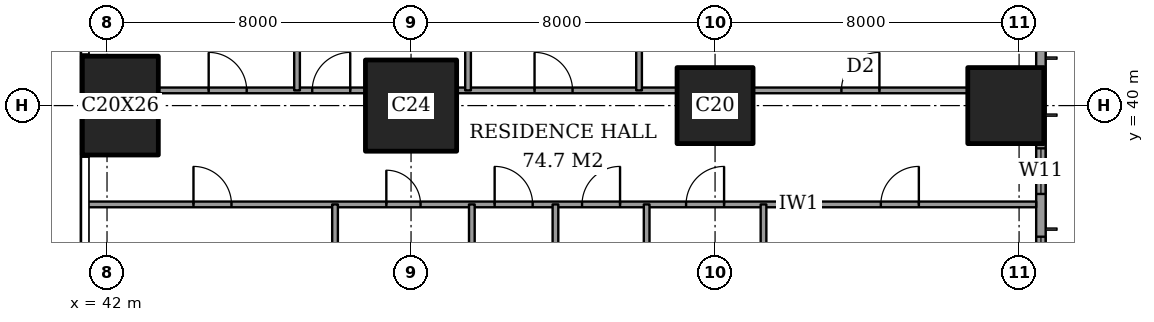
"""IFC4 building model, lengths in metres.
Left out: names, types, materials, properties, quantities, classifications, styles, units other than length and angle.
Written with IfcOpenShell. Run it as: python <this file> out.ifc"""

import sys

from ifc_helpers import new_model, si_unit, direction, frame, frame_2d, origin, origin_2d, place, context, subcontext, project, spatial, rectangle, extrude, element, fill, save


model = new_model("IFC4")
c1 = context("Model", 3, precision=1e-05, world=origin(), true_north=direction((0.0, 1.0)))
c2 = subcontext(c1, "Body", "Model", "MODEL_VIEW")
j1 = project(units=[si_unit("LENGTHUNIT", "METRE"), si_unit("PLANEANGLEUNIT", "RADIAN")], contexts=[c1])
p1 = place(None, origin())
s1 = spatial("IfcSite", under=j1, at=p1, CompositionType="ELEMENT")
p2 = place(p1, origin())
s2 = spatial("IfcBuilding", under=s1, at=p2, CompositionType="ELEMENT")
p3 = place(p2, frame((0.0, 0.0, 128.6)))
s3 = spatial("IfcBuildingStorey", under=s2, at=p3, CompositionType="ELEMENT", Elevation=128.6)
p4 = place(p3, frame((42.35, 40.0, 0.0), z_axis=(0.0, 0.0, 1.0), x_axis=(1.0, 0.0, 0.0)))
e1 = element("IfcColumn", 1, at=p4, inside=s3, PredefinedType="COLUMN", context=c2, shape_type="SweptSolid", body=[
    extrude(rectangle(XDim=2.0, YDim=2.6, at=origin_2d()), origin(), (0.0, 0.0, 1.0), 3.6),
])
p5 = place(p3, frame((50.0, 40.0, 0.0), z_axis=(0.0, 0.0, 1.0), x_axis=(1.0, 0.0, 0.0)))
e2 = element("IfcColumn", 2, at=p5, inside=s3, PredefinedType="COLUMN", context=c2, shape_type="SweptSolid", body=[
    extrude(rectangle(XDim=2.4, YDim=2.4, at=origin_2d()), origin(), (0.0, 0.0, 1.0), 3.6),
])
for number, where, z_axis, x_axis in (
    (3, (58.0, 40.0, 0.0), (0.0, 0.0, 1.0), (1.0, 0.0, 0.0)),
    (4, (65.65, 40.0, 0.0), (0.0, 0.0, 1.0), (1.0, 0.0, 0.0)),
):
    element("IfcColumn", number, at=place(p3, frame(where, z_axis=z_axis, x_axis=x_axis)), inside=s3, PredefinedType="COLUMN", context=c2, shape_type="SweptSolid", body=[
        extrude(rectangle(XDim=2.0, YDim=2.0, at=origin_2d()), origin(), (0.0, 0.0, 1.0), 3.6),
    ])
p6 = place(p3, frame((66.575, 3.175, 0.0), z_axis=(0.0, 0.0, 1.0), x_axis=(0.0, 1.0, 0.0)))
e5 = element("IfcWall", 5, at=p6, inside=s3, PredefinedType="SOLIDWALL", context=c2, shape_type="SweptSolid", body=[
    extrude(rectangle(XDim=41.65, YDim=0.25, at=frame_2d((20.825, 0.0))), origin(), (0.0, 0.0, 1.0), 3.6),
])
p7 = place(p6, frame((0.775, 0.0, 0.4)))
e6 = element("IfcOpeningElement", 6, at=p7, cuts=e5, PredefinedType="OPENING", context=c2, shape_type="SweptSolid", body=[
    extrude(rectangle(XDim=2.4, YDim=2.2, at=frame_2d((1.2, 1.1))), frame((0.0, 0.135, 0.0), z_axis=(0.0, -1.0, 0.0), x_axis=(1.0, 0.0, 0.0)), (0.0, 0.0, 1.0), 0.27),
])
p8 = place(p6, frame((6.125, 0.0, 0.4)))
e7 = element("IfcOpeningElement", 7, at=p8, cuts=e5, PredefinedType="OPENING", context=c2, shape_type="SweptSolid", body=[
    extrude(rectangle(XDim=1.2, YDim=2.2, at=frame_2d((0.6, 1.1))), frame((0.0, 0.135, 0.0), z_axis=(0.0, -1.0, 0.0), x_axis=(1.0, 0.0, 0.0)), (0.0, 0.0, 1.0), 0.27),
])
p9 = place(p6, frame((8.375, 0.0, 0.4)))
e8 = element("IfcOpeningElement", 8, at=p9, cuts=e5, PredefinedType="OPENING", context=c2, shape_type="SweptSolid", body=[
    extrude(rectangle(XDim=2.4, YDim=2.2, at=frame_2d((1.2, 1.1))), frame((0.0, 0.135, 0.0), z_axis=(0.0, -1.0, 0.0), x_axis=(1.0, 0.0, 0.0)), (0.0, 0.0, 1.0), 0.27),
])
p10 = place(p6, frame((15.775, 0.0, 0.4)))
e9 = element("IfcOpeningElement", 9, at=p10, cuts=e5, PredefinedType="OPENING", context=c2, shape_type="SweptSolid", body=[
    extrude(rectangle(XDim=2.4, YDim=2.2, at=frame_2d((1.2, 1.1))), frame((0.0, 0.135, 0.0), z_axis=(0.0, -1.0, 0.0), x_axis=(1.0, 0.0, 0.0)), (0.0, 0.0, 1.0), 0.27),
])
p11 = place(p6, frame((23.475, 0.0, 0.4)))
e10 = element("IfcOpeningElement", 10, at=p11, cuts=e5, PredefinedType="OPENING", context=c2, shape_type="SweptSolid", body=[
    extrude(rectangle(XDim=2.4, YDim=2.2, at=frame_2d((1.2, 1.1))), frame((0.0, 0.135, 0.0), z_axis=(0.0, -1.0, 0.0), x_axis=(1.0, 0.0, 0.0)), (0.0, 0.0, 1.0), 0.27),
])
p12 = place(p6, frame((30.975, 0.0, 0.4)))
e11 = element("IfcOpeningElement", 11, at=p12, cuts=e5, PredefinedType="OPENING", context=c2, shape_type="SweptSolid", body=[
    extrude(rectangle(XDim=2.4, YDim=2.2, at=frame_2d((1.2, 1.1))), frame((0.0, 0.135, 0.0), z_axis=(0.0, -1.0, 0.0), x_axis=(1.0, 0.0, 0.0)), (0.0, 0.0, 1.0), 0.27),
])
p13 = place(p6, frame((34.5, 0.0, 0.4)))
e12 = element("IfcOpeningElement", 12, at=p13, cuts=e5, PredefinedType="OPENING", context=c2, shape_type="SweptSolid", body=[
    extrude(rectangle(XDim=1.2, YDim=2.2, at=frame_2d((0.6, 1.1))), frame((0.0, 0.135, 0.0), z_axis=(0.0, -1.0, 0.0), x_axis=(1.0, 0.0, 0.0)), (0.0, 0.0, 1.0), 0.27),
])
p14 = place(p6, frame((38.475, 0.0, 0.4)))
e13 = element("IfcOpeningElement", 13, at=p14, cuts=e5, PredefinedType="OPENING", context=c2, shape_type="SweptSolid", body=[
    extrude(rectangle(XDim=2.4, YDim=2.2, at=frame_2d((1.2, 1.1))), frame((0.0, 0.135, 0.0), z_axis=(0.0, -1.0, 0.0), x_axis=(1.0, 0.0, 0.0)), (0.0, 0.0, 1.0), 0.27),
])
p15 = place(p3, frame((41.439, 37.4, 0.0), z_axis=(0.0, 0.0, 1.0), x_axis=(1.0, 0.0, 0.0)))
e14 = element("IfcWall", 14, at=p15, inside=s3, PredefinedType="PARTITIONING", context=c2, shape_type="SweptSolid", body=[
    extrude(rectangle(XDim=25.011, YDim=0.15, at=frame_2d((12.505, 0.0))), origin(), (0.0, 0.0, 1.0), 3.35),
])
p16 = place(p15, frame((10.761, 0.0, 0.0)))
e15 = element("IfcOpeningElement", 15, at=p16, cuts=e14, PredefinedType="OPENING", context=c2, shape_type="SweptSolid", body=[
    extrude(rectangle(XDim=1.0, YDim=2.1, at=frame_2d((0.5, 1.05))), frame((0.0, 0.085, 0.0), z_axis=(0.0, -1.0, 0.0), x_axis=(1.0, 0.0, 0.0)), (0.0, 0.0, 1.0), 0.17),
])
p17 = place(p15, frame((20.924, 0.0, 0.0)))
e16 = element("IfcOpeningElement", 16, at=p17, cuts=e14, PredefinedType="OPENING", context=c2, shape_type="SweptSolid", body=[
    extrude(rectangle(XDim=1.0, YDim=2.1, at=frame_2d((0.5, 1.05))), frame((0.0, 0.085, 0.0), z_axis=(0.0, -1.0, 0.0), x_axis=(1.0, 0.0, 0.0)), (0.0, 0.0, 1.0), 0.17),
])
p18 = place(p15, frame((15.799, 0.0, 0.0)))
e17 = element("IfcOpeningElement", 17, at=p18, cuts=e14, PredefinedType="OPENING", context=c2, shape_type="SweptSolid", body=[
    extrude(rectangle(XDim=1.0, YDim=2.1, at=frame_2d((0.5, 1.05))), frame((0.0, 0.085, 0.0), z_axis=(0.0, -1.0, 0.0), x_axis=(1.0, 0.0, 0.0)), (0.0, 0.0, 1.0), 0.17),
])
p19 = place(p15, frame((13.061, 0.0, 0.0)))
e18 = element("IfcOpeningElement", 18, at=p19, cuts=e14, PredefinedType="OPENING", context=c2, shape_type="SweptSolid", body=[
    extrude(rectangle(XDim=1.0, YDim=2.1, at=frame_2d((0.5, 1.05))), frame((0.0, 0.085, 0.0), z_axis=(0.0, -1.0, 0.0), x_axis=(1.0, 0.0, 0.0)), (0.0, 0.0, 1.0), 0.17),
])
p20 = place(p15, frame((7.911, 0.0, 0.0)))
e19 = element("IfcOpeningElement", 19, at=p20, cuts=e14, PredefinedType="OPENING", context=c2, shape_type="SweptSolid", body=[
    extrude(rectangle(XDim=0.9, YDim=2.1, at=frame_2d((0.45, 1.05))), frame((0.0, 0.085, 0.0), z_axis=(0.0, -1.0, 0.0), x_axis=(1.0, 0.0, 0.0)), (0.0, 0.0, 1.0), 0.17),
])
p21 = place(p15, frame((2.836, 0.0, 0.0)))
e20 = element("IfcOpeningElement", 20, at=p21, cuts=e14, PredefinedType="OPENING", context=c2, shape_type="SweptSolid", body=[
    extrude(rectangle(XDim=1.0, YDim=2.1, at=frame_2d((0.5, 1.05))), frame((0.0, 0.085, 0.0), z_axis=(0.0, -1.0, 0.0), x_axis=(1.0, 0.0, 0.0)), (0.0, 0.0, 1.0), 0.17),
])
p22 = place(p3, frame((43.35, 40.4, 0.0), z_axis=(0.0, 0.0, 1.0), x_axis=(1.0, 0.0, 0.0)))
e21 = element("IfcWall", 21, at=p22, inside=s3, PredefinedType="PARTITIONING", context=c2, shape_type="SweptSolid", body=[
    extrude(rectangle(XDim=5.45, YDim=0.15, at=frame_2d((2.725, 0.0))), origin(), (0.0, 0.0, 1.0), 3.35),
])
p23 = place(p22, frame((4.05, 0.0, 0.0)))
e22 = element("IfcOpeningElement", 22, at=p23, cuts=e21, PredefinedType="OPENING", context=c2, shape_type="SweptSolid", body=[
    extrude(rectangle(XDim=1.0, YDim=2.1, at=frame_2d((0.5, 1.05))), frame((0.0, 0.085, 0.0), z_axis=(0.0, -1.0, 0.0), x_axis=(1.0, 0.0, 0.0)), (0.0, 0.0, 1.0), 0.17),
])
p24 = place(p22, frame((1.325, 0.0, 0.0)))
e23 = element("IfcOpeningElement", 23, at=p24, cuts=e21, PredefinedType="OPENING", context=c2, shape_type="SweptSolid", body=[
    extrude(rectangle(XDim=1.0, YDim=2.1, at=frame_2d((0.5, 1.05))), frame((0.0, 0.085, 0.0), z_axis=(0.0, -1.0, 0.0), x_axis=(1.0, 0.0, 0.0)), (0.0, 0.0, 1.0), 0.17),
])
p25 = place(p3, frame((51.2, 40.4, 0.0), z_axis=(0.0, 0.0, 1.0), x_axis=(1.0, 0.0, 0.0)))
e24 = element("IfcWall", 24, at=p25, inside=s3, PredefinedType="PARTITIONING", context=c2, shape_type="SweptSolid", body=[
    extrude(rectangle(XDim=5.8, YDim=0.15, at=frame_2d((2.9, 0.0))), origin(), (0.0, 0.0, 1.0), 3.35),
])
p26 = place(p25, frame((2.05, 0.0, 0.0)))
e25 = element("IfcOpeningElement", 25, at=p26, cuts=e24, PredefinedType="OPENING", context=c2, shape_type="SweptSolid", body=[
    extrude(rectangle(XDim=1.0, YDim=2.1, at=frame_2d((0.5, 1.05))), frame((0.0, 0.085, 0.0), z_axis=(0.0, -1.0, 0.0), x_axis=(1.0, 0.0, 0.0)), (0.0, 0.0, 1.0), 0.17),
])
p27 = place(p3, frame((59.0, 40.4, 0.0), z_axis=(0.0, 0.0, 1.0), x_axis=(1.0, 0.0, 0.0)))
e26 = element("IfcWall", 26, at=p27, inside=s3, PredefinedType="PARTITIONING", context=c2, shape_type="SweptSolid", body=[
    extrude(rectangle(XDim=5.65, YDim=0.15, at=frame_2d((2.825, 0.0))), origin(), (0.0, 0.0, 1.0), 3.35),
])
p28 = place(p27, frame((2.325, 0.0, 0.0)))
e27 = element("IfcOpeningElement", 27, at=p28, cuts=e26, PredefinedType="OPENING", context=c2, shape_type="SweptSolid", body=[
    extrude(rectangle(XDim=1.0, YDim=2.1, at=frame_2d((0.5, 1.05))), frame((0.0, 0.085, 0.0), z_axis=(0.0, -1.0, 0.0), x_axis=(1.0, 0.0, 0.0)), (0.0, 0.0, 1.0), 0.17),
])
p29 = place(p3, frame((47.0, 40.4, 0.0), z_axis=(0.0, 0.0, 1.0), x_axis=(0.0, 1.0, 0.0)))
e28 = element("IfcWall", 28, at=p29, inside=s3, PredefinedType="PARTITIONING", context=c2, shape_type="SweptSolid", body=[
    extrude(rectangle(XDim=8.05, YDim=0.15, at=frame_2d((4.025, 0.0))), origin(), (0.0, 0.0, 1.0), 3.35),
])
p30 = place(p3, frame((48.0, 28.0, 0.0), z_axis=(0.0, 0.0, 1.0), x_axis=(0.0, 1.0, 0.0)))
e29 = element("IfcWall", 29, at=p30, inside=s3, PredefinedType="PARTITIONING", context=c2, shape_type="SweptSolid", body=[
    extrude(rectangle(XDim=9.4, YDim=0.15, at=frame_2d((4.7, 0.0))), origin(), (0.0, 0.0, 1.0), 3.35),
])
p31 = place(p30, frame((0.325, 0.0, 0.0)))
e30 = element("IfcOpeningElement", 30, at=p31, cuts=e29, PredefinedType="OPENING", context=c2, shape_type="SweptSolid", body=[
    extrude(rectangle(XDim=0.9, YDim=2.1, at=frame_2d((0.45, 1.05))), frame((0.0, 0.085, 0.0), z_axis=(0.0, -1.0, 0.0), x_axis=(1.0, 0.0, 0.0)), (0.0, 0.0, 1.0), 0.17),
])
p32 = place(p3, frame((51.5, 40.4, 0.0), z_axis=(0.0, 0.0, 1.0), x_axis=(0.0, 1.0, 0.0)))
e31 = element("IfcWall", 31, at=p32, inside=s3, PredefinedType="PARTITIONING", context=c2, shape_type="SweptSolid", body=[
    extrude(rectangle(XDim=8.05, YDim=0.15, at=frame_2d((4.025, 0.0))), origin(), (0.0, 0.0, 1.0), 3.35),
])
for number, where, z_axis, x_axis in (
    (32, (51.6, 29.55, 0.0), (0.0, 0.0, 1.0), (0.0, 1.0, 0.0)),
    (33, (53.8, 29.55, 0.0), (0.0, 0.0, 1.0), (0.0, 1.0, 0.0)),
):
    element("IfcWall", number, at=place(p3, frame(where, z_axis=z_axis, x_axis=x_axis)), inside=s3, PredefinedType="PARTITIONING", context=c2, shape_type="SweptSolid", body=[
        extrude(rectangle(XDim=7.85, YDim=0.15, at=frame_2d((3.925, 0.0))), origin(), (0.0, 0.0, 1.0), 3.35),
    ])
p33 = place(p3, frame((56.0, 40.4, 0.0), z_axis=(0.0, 0.0, 1.0), x_axis=(0.0, 1.0, 0.0)))
e34 = element("IfcWall", 34, at=p33, inside=s3, PredefinedType="PARTITIONING", context=c2, shape_type="SweptSolid", body=[
    extrude(rectangle(XDim=8.05, YDim=0.15, at=frame_2d((4.025, 0.0))), origin(), (0.0, 0.0, 1.0), 3.35),
])
p34 = place(p3, frame((56.2, 28.0, 0.0), z_axis=(0.0, 0.0, 1.0), x_axis=(0.0, 1.0, 0.0)))
e35 = element("IfcWall", 35, at=p34, inside=s3, PredefinedType="PARTITIONING", context=c2, shape_type="SweptSolid", body=[
    extrude(rectangle(XDim=9.4, YDim=0.15, at=frame_2d((4.7, 0.0))), origin(), (0.0, 0.0, 1.0), 3.35),
])
p35 = place(p34, frame((0.325, 0.0, 0.0)))
e36 = element("IfcOpeningElement", 36, at=p35, cuts=e35, PredefinedType="OPENING", context=c2, shape_type="SweptSolid", body=[
    extrude(rectangle(XDim=0.9, YDim=2.1, at=frame_2d((0.45, 1.05))), frame((0.0, 0.085, 0.0), z_axis=(0.0, -1.0, 0.0), x_axis=(1.0, 0.0, 0.0)), (0.0, 0.0, 1.0), 0.17),
])
p36 = place(p3, frame((59.275, 33.2, 0.0), z_axis=(0.0, 0.0, 1.0), x_axis=(0.0, 1.0, 0.0)))
e37 = element("IfcWall", 37, at=p36, inside=s3, PredefinedType="PARTITIONING", context=c2, shape_type="SweptSolid", body=[
    extrude(rectangle(XDim=4.2, YDim=0.15, at=frame_2d((2.1, 0.0))), origin(), (0.0, 0.0, 1.0), 3.35),
])
p37 = place(p12, origin())
e38 = element("IfcWindow", 38, at=p37, inside=s3, PartitioningType="SINGLE_PANEL", PredefinedType="WINDOW", context=c2, shape_type="SweptSolid", body=[
    extrude(rectangle(XDim=2.4, YDim=2.2, at=frame_2d((1.2, 1.1))), frame((0.0, 0.03, 0.0), z_axis=(0.0, -1.0, 0.0), x_axis=(1.0, 0.0, 0.0)), (0.0, 0.0, 1.0), 0.06),
])
fill(e11, e38)
p38 = place(p13, origin())
e39 = element("IfcWindow", 39, at=p38, inside=s3, PartitioningType="SINGLE_PANEL", PredefinedType="WINDOW", context=c2, shape_type="SweptSolid", body=[
    extrude(rectangle(XDim=1.2, YDim=2.2, at=frame_2d((0.6, 1.1))), frame((0.0, 0.03, 0.0), z_axis=(0.0, -1.0, 0.0), x_axis=(1.0, 0.0, 0.0)), (0.0, 0.0, 1.0), 0.06),
])
fill(e12, e39)
p39 = place(p28, origin())
e40 = element("IfcDoor", 40, at=p39, inside=s3, OperationType="SINGLE_SWING_LEFT", PredefinedType="DOOR", context=c2, shape_type="SweptSolid", body=[
    extrude(rectangle(XDim=1.0, YDim=2.1, at=frame_2d((0.5, 1.05))), frame((0.0, 0.025, 0.0), z_axis=(0.0, -1.0, 0.0), x_axis=(1.0, 0.0, 0.0)), (0.0, 0.0, 1.0), 0.05),
])
fill(e27, e40)
p40 = place(p26, origin())
e41 = element("IfcDoor", 41, at=p40, inside=s3, OperationType="SINGLE_SWING_RIGHT", PredefinedType="DOOR", context=c2, shape_type="SweptSolid", body=[
    extrude(rectangle(XDim=1.0, YDim=2.1, at=frame_2d((0.5, 1.05))), frame((0.0, 0.025, 0.0), z_axis=(0.0, -1.0, 0.0), x_axis=(1.0, 0.0, 0.0)), (0.0, 0.0, 1.0), 0.05),
])
fill(e25, e41)
p41 = place(p23, origin())
e42 = element("IfcDoor", 42, at=p41, inside=s3, OperationType="SINGLE_SWING_LEFT", PredefinedType="DOOR", context=c2, shape_type="SweptSolid", body=[
    extrude(rectangle(XDim=1.0, YDim=2.1, at=frame_2d((0.5, 1.05))), frame((0.0, 0.025, 0.0), z_axis=(0.0, -1.0, 0.0), x_axis=(1.0, 0.0, 0.0)), (0.0, 0.0, 1.0), 0.05),
])
fill(e22, e42)
p42 = place(p24, origin())
e43 = element("IfcDoor", 43, at=p42, inside=s3, OperationType="SINGLE_SWING_RIGHT", PredefinedType="DOOR", context=c2, shape_type="SweptSolid", body=[
    extrude(rectangle(XDim=1.0, YDim=2.1, at=frame_2d((0.5, 1.05))), frame((0.0, 0.025, 0.0), z_axis=(0.0, -1.0, 0.0), x_axis=(1.0, 0.0, 0.0)), (0.0, 0.0, 1.0), 0.05),
])
fill(e23, e43)
p43 = place(p16, origin())
e44 = element("IfcDoor", 44, at=p43, inside=s3, OperationType="SINGLE_SWING_RIGHT", PredefinedType="DOOR", context=c2, shape_type="SweptSolid", body=[
    extrude(rectangle(XDim=1.0, YDim=2.1, at=frame_2d((0.5, 1.05))), frame((0.0, 0.025, 0.0), z_axis=(0.0, -1.0, 0.0), x_axis=(1.0, 0.0, 0.0)), (0.0, 0.0, 1.0), 0.05),
])
fill(e15, e44)
p44 = place(p17, origin())
e45 = element("IfcDoor", 45, at=p44, inside=s3, OperationType="SINGLE_SWING_LEFT", PredefinedType="DOOR", context=c2, shape_type="SweptSolid", body=[
    extrude(rectangle(XDim=1.0, YDim=2.1, at=frame_2d((0.5, 1.05))), frame((0.0, 0.025, 0.0), z_axis=(0.0, -1.0, 0.0), x_axis=(1.0, 0.0, 0.0)), (0.0, 0.0, 1.0), 0.05),
])
fill(e16, e45)
p45 = place(p18, origin())
e46 = element("IfcDoor", 46, at=p45, inside=s3, OperationType="SINGLE_SWING_LEFT", PredefinedType="DOOR", context=c2, shape_type="SweptSolid", body=[
    extrude(rectangle(XDim=1.0, YDim=2.1, at=frame_2d((0.5, 1.05))), frame((0.0, 0.025, 0.0), z_axis=(0.0, -1.0, 0.0), x_axis=(1.0, 0.0, 0.0)), (0.0, 0.0, 1.0), 0.05),
])
fill(e17, e46)
p46 = place(p19, origin())
e47 = element("IfcDoor", 47, at=p46, inside=s3, OperationType="SINGLE_SWING_LEFT", PredefinedType="DOOR", context=c2, shape_type="SweptSolid", body=[
    extrude(rectangle(XDim=1.0, YDim=2.1, at=frame_2d((0.5, 1.05))), frame((0.0, 0.025, 0.0), z_axis=(0.0, -1.0, 0.0), x_axis=(1.0, 0.0, 0.0)), (0.0, 0.0, 1.0), 0.05),
])
fill(e18, e47)
p47 = place(p20, origin())
e48 = element("IfcDoor", 48, at=p47, inside=s3, OperationType="SINGLE_SWING_RIGHT", PredefinedType="DOOR", context=c2, shape_type="SweptSolid", body=[
    extrude(rectangle(XDim=0.9, YDim=2.1, at=frame_2d((0.45, 1.05))), frame((0.0, 0.025, 0.0), z_axis=(0.0, -1.0, 0.0), x_axis=(1.0, 0.0, 0.0)), (0.0, 0.0, 1.0), 0.05),
])
fill(e19, e48)
p48 = place(p21, origin())
e49 = element("IfcDoor", 49, at=p48, inside=s3, OperationType="SINGLE_SWING_RIGHT", PredefinedType="DOOR", context=c2, shape_type="SweptSolid", body=[
    extrude(rectangle(XDim=1.0, YDim=2.1, at=frame_2d((0.5, 1.05))), frame((0.0, 0.025, 0.0), z_axis=(0.0, -1.0, 0.0), x_axis=(1.0, 0.0, 0.0)), (0.0, 0.0, 1.0), 0.05),
])
fill(e20, e49)
save(model, sys.argv[1])
